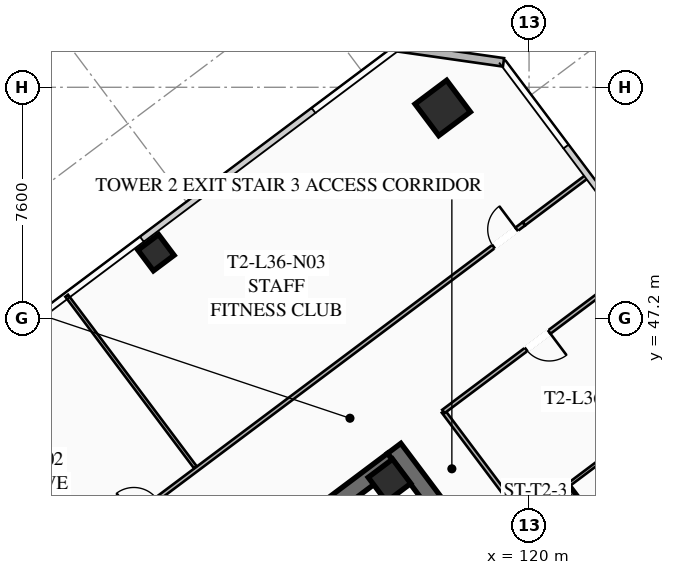
"""IFC4 building model, lengths in metres.
Left out: names, types, materials, properties, quantities, classifications, styles, units other than length and angle.
Written with IfcOpenShell. Run it as: python <this file> out.ifc"""

import sys

from ifc_helpers import new_model, si_unit, direction, frame, frame_2d, origin, origin_2d, place, context, subcontext, project, spatial, rectangle, hollow_rectangle, extrude, element, fill, save


model = new_model("IFC4")
c1 = context("Model", 3, precision=1e-05, world=origin(), true_north=direction((0.0, 1.0)))
c2 = subcontext(c1, "Body", "Model", "MODEL_VIEW")
j1 = project(units=[si_unit("LENGTHUNIT", "METRE"), si_unit("PLANEANGLEUNIT", "RADIAN")], contexts=[c1])
p1 = place(None, origin())
s1 = spatial("IfcSite", under=j1, at=p1, CompositionType="ELEMENT")
p2 = place(p1, origin())
s2 = spatial("IfcBuilding", under=s1, at=p2, CompositionType="ELEMENT")
p3 = place(p2, frame((0.0, 0.0, 135.7)))
s3 = spatial("IfcBuildingStorey", under=s2, at=p3, CompositionType="ELEMENT", Elevation=135.7)
p4 = place(p3, frame((115.564, 42.923, 0.0), z_axis=(0.0, 0.0, 1.0), x_axis=(0.600005007985, -0.799996243986, 0.0)))
e1 = element("IfcWall", 1, at=p4, inside=s3, PredefinedType="SHEAR", context=c2, shape_type="SweptSolid", body=[
    extrude(rectangle(XDim=15.6, YDim=0.55, at=frame_2d((7.8, 0.0))), origin(), (0.0, 0.0, 1.0), 3.55),
])
p5 = place(p3, frame((103.461, 33.502, 0.0), z_axis=(0.0, 0.0, 1.0), x_axis=(0.799998054672, 0.600002593761, 0.0)))
e2 = element("IfcWall", 2, at=p5, inside=s3, PredefinedType="SHEAR", context=c2, shape_type="SweptSolid", body=[
    extrude(rectangle(XDim=15.06, YDim=0.55, at=frame_2d((7.53, 0.0))), origin(), (0.0, 0.0, 1.0), 3.55),
])
p6 = place(p5, frame((4.58, 0.0, 0.0)))
e3 = element("IfcOpeningElement", 3, at=p6, cuts=e2, PredefinedType="OPENING", context=c2, shape_type="SweptSolid", body=[
    extrude(rectangle(XDim=1.25, YDim=2.25, at=frame_2d((0.625, 1.125))), frame((0.0, 0.285, 0.0), z_axis=(0.0, -1.0, 0.0), x_axis=(1.0, 0.0, 0.0)), (0.0, 0.0, 1.0), 0.57),
])
p7 = place(p5, frame((9.63, 0.0, 0.0)))
e4 = element("IfcOpeningElement", 4, at=p7, cuts=e2, PredefinedType="OPENING", context=c2, shape_type="SweptSolid", body=[
    extrude(rectangle(XDim=1.25, YDim=2.25, at=frame_2d((0.625, 1.125))), frame((0.0, 0.285, 0.0), z_axis=(0.0, -1.0, 0.0), x_axis=(1.0, 0.0, 0.0)), (0.0, 0.0, 1.0), 0.57),
])
p8 = place(p3, frame((115.41, 41.87, 0.0), z_axis=(0.0, 0.0, 1.0), x_axis=(0.799999996291, 0.600000004945, 0.0)))
e5 = element("IfcColumn", 5, at=p8, inside=s3, PredefinedType="COLUMN", context=c2, shape_type="SweptSolid", body=[
    extrude(hollow_rectangle(XDim=1.0, YDim=1.0, WallThickness=0.04, at=origin_2d()), origin(), (0.0, 0.0, 1.0), 3.37),
])
p9 = place(p3, frame((117.16, 54.12, 0.0), z_axis=(0.0, 0.0, 1.0), x_axis=(0.799999996291, 0.600000004945, 0.0)))
e6 = element("IfcColumn", 6, at=p9, inside=s3, PredefinedType="COLUMN", context=c2, shape_type="SweptSolid", body=[
    extrude(hollow_rectangle(XDim=1.3, YDim=1.3, WallThickness=0.05, at=origin_2d()), origin(), (0.0, 0.0, 1.0), 3.37),
])
p10 = place(p3, frame((107.73, 49.36, 0.0), z_axis=(0.0, 0.0, 1.0), x_axis=(0.799999996291, 0.600000004945, 0.0)))
e7 = element("IfcColumn", 7, at=p10, inside=s3, PredefinedType="COLUMN", context=c2, shape_type="SweptSolid", body=[
    extrude(hollow_rectangle(XDim=0.85, YDim=0.85, WallThickness=0.035, at=origin_2d()), origin(), (0.0, 0.0, 1.0), 3.37),
])
p11 = place(p3, frame((115.66, 56.12, 0.0), z_axis=(0.0, 0.0, 1.0), x_axis=(0.989949493661, -0.141421356237, 0.0)))
e8 = element("IfcWall", 8, at=p11, inside=s3, PredefinedType="SOLIDWALL", context=c2, shape_type="SweptSolid", body=[
    extrude(rectangle(XDim=3.536, YDim=0.28, at=frame_2d((1.768, 0.0))), origin(), (0.0, 0.0, 1.0), 3.37),
])
p12 = place(p3, frame((125.304, 36.228, 0.0), z_axis=(0.0, 0.0, 1.0), x_axis=(-0.59998851072, 0.800008616831, 0.0)))
e9 = element("IfcWall", 9, at=p12, inside=s3, PredefinedType="SHEAR", context=c2, shape_type="SweptSolid", body=[
    extrude(rectangle(XDim=6.8, YDim=0.2, at=frame_2d((3.4, 0.0))), origin(), (0.0, 0.0, 1.0), 3.37),
])
p13 = place(p3, frame((121.204, 41.528, 0.0), z_axis=(0.0, 0.0, 1.0), x_axis=(-0.800017232136, -0.599977023131, 0.0)))
e10 = element("IfcWall", 10, at=p13, inside=s3, PredefinedType="SHEAR", context=c2, shape_type="SweptSolid", body=[
    extrude(rectangle(XDim=3.4, YDim=0.2, at=frame_2d((1.7, 0.0))), origin(), (0.0, 0.0, 1.0), 3.37),
])
p14 = place(p13, frame((1.975, 0.0, 0.0)))
e11 = element("IfcOpeningElement", 11, at=p14, cuts=e10, PredefinedType="OPENING", context=c2, shape_type="SweptSolid", body=[
    extrude(rectangle(XDim=1.15, YDim=2.2, at=frame_2d((0.575, 1.1))), frame((0.0, 0.11, 0.0), z_axis=(0.0, -1.0, 0.0), x_axis=(1.0, 0.0, 0.0)), (0.0, 0.0, 1.0), 0.22),
])
p15 = place(p3, frame((119.824, 40.618, 0.0), z_axis=(0.0, 0.0, 1.0), x_axis=(-0.599982243973, 0.800013316712, 0.0)))
e12 = element("IfcWall", 12, at=p15, inside=s3, PredefinedType="PARTITIONING", context=c2, shape_type="SweptSolid", body=[
    extrude(rectangle(XDim=4.4, YDim=0.135, at=frame_2d((2.2, 0.0))), origin(), (0.0, 0.0, 1.0), 2.723),
])
p16 = place(p3, frame((94.79, 31.53, 0.0), z_axis=(0.0, 0.0, 1.0), x_axis=(0.8, 0.6, 0.0)))
e13 = element("IfcWall", 13, at=p16, inside=s3, PredefinedType="PARTITIONING", context=c2, shape_type="SweptSolid", body=[
    extrude(rectangle(XDim=31.3, YDim=0.135, at=frame_2d((15.65, 0.0))), origin(), (0.0, 0.0, 1.0), 2.723),
])
p17 = place(p16, frame((0.3, 0.0, 0.0)))
e14 = element("IfcOpeningElement", 14, at=p17, cuts=e13, PredefinedType="OPENING", context=c2, shape_type="SweptSolid", body=[
    extrude(rectangle(XDim=0.95, YDim=2.05, at=frame_2d((0.475, 1.025))), frame((0.0, 0.077, 0.0), z_axis=(0.0, -1.0, 0.0), x_axis=(1.0, 0.0, 0.0)), (0.0, 0.0, 1.0), 0.155),
])
p18 = place(p16, frame((15.263, 0.0, 0.0)))
e15 = element("IfcOpeningElement", 15, at=p18, cuts=e13, PredefinedType="OPENING", context=c2, shape_type="SweptSolid", body=[
    extrude(rectangle(XDim=0.95, YDim=2.05, at=frame_2d((0.475, 1.025))), frame((0.0, 0.077, 0.0), z_axis=(0.0, -1.0, 0.0), x_axis=(1.0, 0.0, 0.0)), (0.0, 0.0, 1.0), 0.155),
])
p19 = place(p16, frame((30.05, 0.0, 0.0)))
e16 = element("IfcOpeningElement", 16, at=p19, cuts=e13, PredefinedType="OPENING", context=c2, shape_type="SweptSolid", body=[
    extrude(rectangle(XDim=0.95, YDim=2.05, at=frame_2d((0.475, 1.025))), frame((0.0, 0.077, 0.0), z_axis=(0.0, -1.0, 0.0), x_axis=(1.0, 0.0, 0.0)), (0.0, 0.0, 1.0), 0.155),
])
p20 = place(p3, frame((119.83, 50.31, 0.0), z_axis=(0.0, 0.0, 1.0), x_axis=(0.80002227902, 0.599970293491, 0.0)))
e17 = element("IfcWall", 17, at=p20, inside=s3, PredefinedType="PARTITIONING", context=c2, shape_type="SweptSolid", body=[
    extrude(rectangle(XDim=2.63, YDim=0.135, at=frame_2d((1.315, 0.0))), origin(), (0.0, 0.0, 1.0), 2.723),
])
p21 = place(p3, frame((109.022, 42.304, 0.0), z_axis=(0.0, 0.0, 1.0), x_axis=(-0.599988918536, 0.800008310978, 0.0)))
e18 = element("IfcWall", 18, at=p21, inside=s3, PredefinedType="PARTITIONING", context=c2, shape_type="SweptSolid", body=[
    extrude(rectangle(XDim=7.05, YDim=0.11, at=frame_2d((3.525, 0.0))), origin(), (0.0, 0.0, 1.0), 2.723),
])
p22 = place(p3, frame((123.944, 49.208, 0.0), z_axis=(0.0, 0.0, 1.0), x_axis=(-0.799996532921, -0.600004622744, 0.0)))
e19 = element("IfcWall", 19, at=p22, inside=s3, PredefinedType="PARTITIONING", context=c2, shape_type="SweptSolid", body=[
    extrude(rectangle(XDim=8.45, YDim=0.135, at=frame_2d((4.225, 0.0))), origin(), (0.0, 0.0, 1.0), 2.723),
])
p23 = place(p22, frame((4.1, 0.0, 0.0)))
e20 = element("IfcOpeningElement", 20, at=p23, cuts=e19, PredefinedType="OPENING", context=c2, shape_type="SweptSolid", body=[
    extrude(rectangle(XDim=0.95, YDim=2.05, at=frame_2d((0.475, 1.025))), frame((0.0, 0.077, 0.0), z_axis=(0.0, -1.0, 0.0), x_axis=(1.0, 0.0, 0.0)), (0.0, 0.0, 1.0), 0.155),
])
p24 = place(p3, frame((126.584, 45.688, 0.0), z_axis=(0.0, 0.0, 1.0), x_axis=(-0.800004438899, -0.599994081423, 0.0)))
e21 = element("IfcWall", 21, at=p24, inside=s3, PredefinedType="PARTITIONING", context=c2, shape_type="SweptSolid", body=[
    extrude(rectangle(XDim=6.6, YDim=0.11, at=frame_2d((3.3, 0.0))), origin(), (0.0, 0.0, 1.0), 2.723),
])
p25 = place(p19, origin())
e22 = element("IfcDoor", 22, at=p25, inside=s3, OperationType="SINGLE_SWING_RIGHT", PredefinedType="DOOR", context=c2, shape_type="SweptSolid", body=[
    extrude(rectangle(XDim=0.95, YDim=2.05, at=frame_2d((0.475, 1.025))), frame((0.0, 0.025, 0.0), z_axis=(0.0, -1.0, 0.0), x_axis=(1.0, 0.0, 0.0)), (0.0, 0.0, 1.0), 0.05),
])
fill(e16, e22)
p26 = place(p23, origin())
e23 = element("IfcDoor", 23, at=p26, inside=s3, OperationType="SINGLE_SWING_LEFT", PredefinedType="DOOR", context=c2, shape_type="SweptSolid", body=[
    extrude(rectangle(XDim=0.95, YDim=2.05, at=frame_2d((0.475, 1.025))), frame((0.0, 0.025, 0.0), z_axis=(0.0, -1.0, 0.0), x_axis=(1.0, 0.0, 0.0)), (0.0, 0.0, 1.0), 0.05),
])
fill(e20, e23)
save(model, sys.argv[1])
